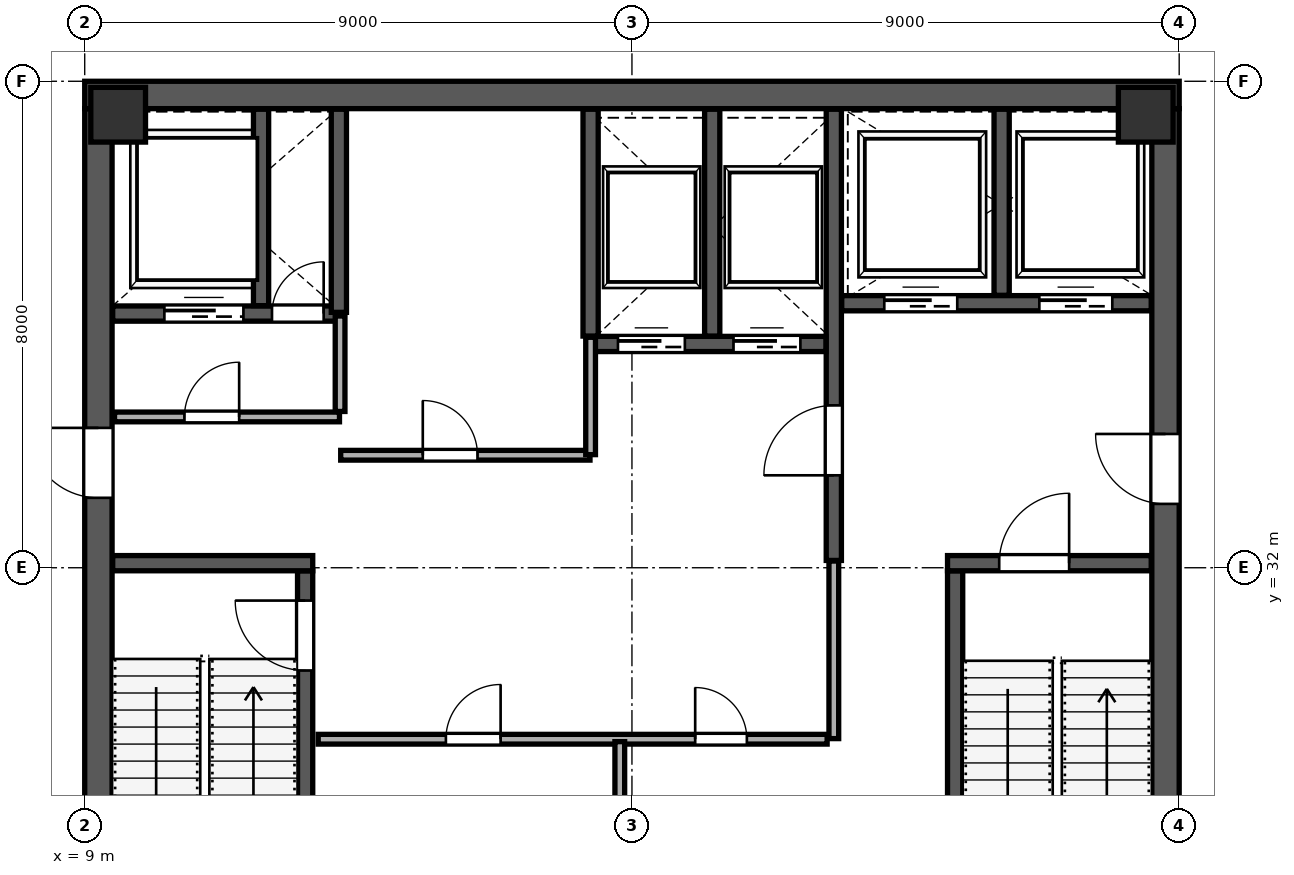
"""IFC4 building model, lengths in metres.
Left out: names, types, materials, properties, quantities, classifications, styles, units other than length and angle.
Written with IfcOpenShell. Run it as: python <this file> out.ifc"""

import sys

from ifc_helpers import new_model, si_unit, direction, frame, frame_2d, origin, origin_2d, place, context, subcontext, project, spatial, rectangle, extrude, source, transform, mapped, element, fill, save


model = new_model("IFC4")
c1 = context("Model", 3, precision=1e-05, world=origin(), true_north=direction((0.0, 1.0)))
c2 = subcontext(c1, "Body", "Model", "MODEL_VIEW")
j1 = project(units=[si_unit("LENGTHUNIT", "METRE"), si_unit("PLANEANGLEUNIT", "RADIAN")], contexts=[c1])
p1 = place(None, origin())
s1 = spatial("IfcSite", under=j1, at=p1, CompositionType="ELEMENT")
p2 = place(p1, origin())
s2 = spatial("IfcBuilding", under=s1, at=p2, CompositionType="ELEMENT")
p3 = place(p2, frame((0.0, 0.0, 275.2)))
s3 = spatial("IfcBuildingStorey", under=s2, at=p3, CompositionType="ELEMENT", Elevation=275.2)
m1 = source(origin(), c2, "Body", "SweptSolid", [
    extrude(rectangle(XDim=0.9, YDim=0.9, at=origin_2d()), origin(), (0.0, 0.0, 1.0), 4.198),
])
for number, where, z_axis, x_axis in (
    (1, (9.55, 39.45, 0.001), (0.0, 0.0, 1.0), (1.0, 0.0, 0.0)),
    (2, (26.45, 39.45, 0.001), (0.0, 0.0, 1.0), (1.0, 0.0, 0.0)),
):
    element("IfcColumn", number, at=place(p3, frame(where, z_axis=z_axis, x_axis=x_axis)), inside=s3, PredefinedType="COLUMN", context=c2, shape_type="MappedRepresentation", body=[
        mapped(m1, transform((0.0, 0.0, 0.0), scale=1.0)),
    ])
p4 = place(p3, frame((9.225, 24.45, 0.0), z_axis=(0.0, 0.0, 1.0), x_axis=(0.0, 1.0, 0.0)))
e3 = element("IfcWall", 3, at=p4, inside=s3, PredefinedType="SHEAR", context=c2, shape_type="SweptSolid", body=[
    extrude(rectangle(XDim=15.1, YDim=0.45, at=frame_2d((7.55, 0.0))), origin(), (0.0, 0.0, 1.0), 3.96),
])
p5 = place(p4, frame((8.7, 0.0, 0.0)))
e4 = element("IfcOpeningElement", 4, at=p5, cuts=e3, PredefinedType="OPENING", context=c2, shape_type="SweptSolid", body=[
    extrude(rectangle(XDim=1.15, YDim=2.2, at=frame_2d((0.575, 1.1))), frame((0.0, 0.235, 0.0), z_axis=(0.0, -1.0, 0.0), x_axis=(1.0, 0.0, 0.0)), (0.0, 0.0, 1.0), 0.47),
])
p6 = place(p3, frame((26.775, 24.45, 0.0), z_axis=(0.0, 0.0, 1.0), x_axis=(0.0, 1.0, 0.0)))
e5 = element("IfcWall", 5, at=p6, inside=s3, PredefinedType="SHEAR", context=c2, shape_type="SweptSolid", body=[
    extrude(rectangle(XDim=15.1, YDim=0.45, at=frame_2d((7.55, 0.0))), origin(), (0.0, 0.0, 1.0), 3.96),
])
p7 = place(p6, frame((8.6, 0.0, 0.0)))
e6 = element("IfcOpeningElement", 6, at=p7, cuts=e5, PredefinedType="OPENING", context=c2, shape_type="SweptSolid", body=[
    extrude(rectangle(XDim=1.15, YDim=2.2, at=frame_2d((0.575, 1.1))), frame((0.0, 0.235, 0.0), z_axis=(0.0, -1.0, 0.0), x_axis=(1.0, 0.0, 0.0)), (0.0, 0.0, 1.0), 0.47),
])
p8 = place(p3, frame((9.0, 39.775, 0.0), z_axis=(0.0, 0.0, 1.0), x_axis=(1.0, 0.0, 0.0)))
e7 = element("IfcWall", 7, at=p8, inside=s3, PredefinedType="SHEAR", context=c2, shape_type="SweptSolid", body=[
    extrude(rectangle(XDim=18.0, YDim=0.45, at=frame_2d((9.0, 0.0))), origin(), (0.0, 0.0, 1.0), 3.96),
])
p9 = place(p3, frame((12.625, 24.46, 0.0), z_axis=(0.0, 0.0, 1.0), x_axis=(0.0, 1.0, 0.0)))
e8 = element("IfcWall", 8, at=p9, inside=s3, PredefinedType="SHEAR", context=c2, shape_type="SweptSolid", body=[
    extrude(rectangle(XDim=7.49, YDim=0.25, at=frame_2d((3.745, 0.0))), origin(), (0.0, 0.0, 1.0), 3.96),
])
p10 = place(p9, frame((5.85, 0.0, 0.0)))
e9 = element("IfcOpeningElement", 9, at=p10, cuts=e8, PredefinedType="OPENING", context=c2, shape_type="SweptSolid", body=[
    extrude(rectangle(XDim=1.15, YDim=2.2, at=frame_2d((0.575, 1.1))), frame((0.0, 0.135, 0.0), z_axis=(0.0, -1.0, 0.0), x_axis=(1.0, 0.0, 0.0)), (0.0, 0.0, 1.0), 0.27),
])
p11 = place(p3, frame((9.46, 32.075, 0.0), z_axis=(0.0, 0.0, 1.0), x_axis=(1.0, 0.0, 0.0)))
e10 = element("IfcWall", 10, at=p11, inside=s3, PredefinedType="SHEAR", context=c2, shape_type="SweptSolid", body=[
    extrude(rectangle(XDim=3.29, YDim=0.25, at=frame_2d((1.645, 0.0))), origin(), (0.0, 0.0, 1.0), 3.96),
])
p12 = place(p3, frame((23.315, 24.46, 0.0), z_axis=(0.0, 0.0, 1.0), x_axis=(0.0, 1.0, 0.0)))
e11 = element("IfcWall", 11, at=p12, inside=s3, PredefinedType="SHEAR", context=c2, shape_type="SweptSolid", body=[
    extrude(rectangle(XDim=7.49, YDim=0.25, at=frame_2d((3.745, 0.0))), origin(), (0.0, 0.0, 1.0), 3.96),
])
p13 = place(p3, frame((23.19, 32.075, 0.0), z_axis=(0.0, 0.0, 1.0), x_axis=(1.0, 0.0, 0.0)))
e12 = element("IfcWall", 12, at=p13, inside=s3, PredefinedType="SHEAR", context=c2, shape_type="SweptSolid", body=[
    extrude(rectangle(XDim=3.35, YDim=0.25, at=frame_2d((1.675, 0.0))), origin(), (0.0, 0.0, 1.0), 3.96),
])
p14 = place(p13, frame((0.85, 0.0, 0.0)))
e13 = element("IfcOpeningElement", 13, at=p14, cuts=e12, PredefinedType="OPENING", context=c2, shape_type="SweptSolid", body=[
    extrude(rectangle(XDim=1.15, YDim=2.2, at=frame_2d((0.575, 1.1))), frame((0.0, 0.135, 0.0), z_axis=(0.0, -1.0, 0.0), x_axis=(1.0, 0.0, 0.0)), (0.0, 0.0, 1.0), 0.27),
])
p15 = place(p3, frame((21.32, 32.12, 0.0), z_axis=(0.0, 0.0, 1.0), x_axis=(0.0, 1.0, 0.0)))
e14 = element("IfcWall", 14, at=p15, inside=s3, PredefinedType="SHEAR", context=c2, shape_type="SweptSolid", body=[
    extrude(rectangle(XDim=7.42, YDim=0.25, at=frame_2d((3.71, 0.0))), origin(), (0.0, 0.0, 1.0), 3.96),
])
p16 = place(p15, frame((1.4, 0.0, 0.0)))
e15 = element("IfcOpeningElement", 15, at=p16, cuts=e14, PredefinedType="OPENING", context=c2, shape_type="SweptSolid", body=[
    extrude(rectangle(XDim=1.15, YDim=2.2, at=frame_2d((0.575, 1.1))), frame((0.0, 0.135, 0.0), z_axis=(0.0, -1.0, 0.0), x_axis=(1.0, 0.0, 0.0)), (0.0, 0.0, 1.0), 0.27),
])
p17 = place(p3, frame((9.46, 36.18, 0.0), z_axis=(0.0, 0.0, 1.0), x_axis=(1.0, 0.0, 0.0)))
e16 = element("IfcWall", 16, at=p17, inside=s3, PredefinedType="SHEAR", context=c2, shape_type="SweptSolid", body=[
    extrude(rectangle(XDim=3.79, YDim=0.25, at=frame_2d((1.895, 0.0))), origin(), (0.0, 0.0, 1.0), 3.96),
])
p18 = place(p17, frame((2.62, 0.0, 0.0)))
e17 = element("IfcOpeningElement", 17, at=p18, cuts=e16, PredefinedType="OPENING", context=c2, shape_type="SweptSolid", body=[
    extrude(rectangle(XDim=0.85, YDim=2.1, at=frame_2d((0.425, 1.05))), frame((0.0, 0.135, 0.0), z_axis=(0.0, -1.0, 0.0), x_axis=(1.0, 0.0, 0.0)), (0.0, 0.0, 1.0), 0.27),
])
p19 = place(p17, frame((0.85, 0.0, 0.0)))
e18 = element("IfcOpeningElement", 18, at=p19, cuts=e16, PredefinedType="OPENING", context=c2, shape_type="SweptSolid", body=[
    extrude(rectangle(XDim=1.3, YDim=2.25, at=frame_2d((0.65, 1.125))), frame((0.0, 0.135, 0.0), z_axis=(0.0, -1.0, 0.0), x_axis=(1.0, 0.0, 0.0)), (0.0, 0.0, 1.0), 0.27),
])
p20 = place(p3, frame((11.9, 36.31, 0.0), z_axis=(0.0, 0.0, 1.0), x_axis=(0.0, 1.0, 0.0)))
e19 = element("IfcWall", 19, at=p20, inside=s3, PredefinedType="SHEAR", context=c2, shape_type="SweptSolid", body=[
    extrude(rectangle(XDim=3.23, YDim=0.25, at=frame_2d((1.615, 0.0))), origin(), (0.0, 0.0, 1.0), 3.96),
])
p21 = place(p3, frame((21.45, 36.35, 0.0), z_axis=(0.0, 0.0, 1.0), x_axis=(1.0, 0.0, 0.0)))
e20 = element("IfcWall", 20, at=p21, inside=s3, PredefinedType="SHEAR", context=c2, shape_type="SweptSolid", body=[
    extrude(rectangle(XDim=5.09, YDim=0.25, at=frame_2d((2.545, 0.0))), origin(), (0.0, 0.0, 1.0), 3.96),
])
p22 = place(p21, frame((0.7, 0.0, 0.0)))
e21 = element("IfcOpeningElement", 21, at=p22, cuts=e20, PredefinedType="OPENING", context=c2, shape_type="SweptSolid", body=[
    extrude(rectangle(XDim=1.2, YDim=2.2, at=frame_2d((0.6, 1.1))), frame((0.0, 0.135, 0.0), z_axis=(0.0, -1.0, 0.0), x_axis=(1.0, 0.0, 0.0)), (0.0, 0.0, 1.0), 0.27),
])
p23 = place(p21, frame((3.25, 0.0, 0.0)))
e22 = element("IfcOpeningElement", 22, at=p23, cuts=e20, PredefinedType="OPENING", context=c2, shape_type="SweptSolid", body=[
    extrude(rectangle(XDim=1.2, YDim=2.2, at=frame_2d((0.6, 1.1))), frame((0.0, 0.135, 0.0), z_axis=(0.0, -1.0, 0.0), x_axis=(1.0, 0.0, 0.0)), (0.0, 0.0, 1.0), 0.27),
])
p24 = place(p3, frame((24.08, 36.48, 0.0), z_axis=(0.0, 0.0, 1.0), x_axis=(0.0, 1.0, 0.0)))
e23 = element("IfcWall", 23, at=p24, inside=s3, PredefinedType="SHEAR", context=c2, shape_type="SweptSolid", body=[
    extrude(rectangle(XDim=3.06, YDim=0.25, at=frame_2d((1.53, 0.0))), origin(), (0.0, 0.0, 1.0), 3.96),
])
p25 = place(p3, frame((13.18, 36.2, 0.0), z_axis=(0.0, 0.0, 1.0), x_axis=(0.0, 1.0, 0.0)))
e24 = element("IfcWall", 24, at=p25, inside=s3, PredefinedType="SHEAR", context=c2, shape_type="SweptSolid", body=[
    extrude(rectangle(XDim=3.34, YDim=0.25, at=frame_2d((1.67, 0.0))), origin(), (0.0, 0.0, 1.0), 3.96),
])
p26 = place(p3, frame((17.32, 35.68, 0.0), z_axis=(0.0, 0.0, 1.0), x_axis=(1.0, 0.0, 0.0)))
e25 = element("IfcWall", 25, at=p26, inside=s3, PredefinedType="SHEAR", context=c2, shape_type="SweptSolid", body=[
    extrude(rectangle(XDim=3.87, YDim=0.25, at=frame_2d((1.935, 0.0))), origin(), (0.0, 0.0, 1.0), 3.96),
])
p27 = place(p26, frame((0.45, 0.0, 0.0)))
e26 = element("IfcOpeningElement", 26, at=p27, cuts=e25, PredefinedType="OPENING", context=c2, shape_type="SweptSolid", body=[
    extrude(rectangle(XDim=1.1, YDim=2.2, at=frame_2d((0.55, 1.1))), frame((0.0, 0.135, 0.0), z_axis=(0.0, -1.0, 0.0), x_axis=(1.0, 0.0, 0.0)), (0.0, 0.0, 1.0), 0.27),
])
p28 = place(p26, frame((2.35, 0.0, 0.0)))
e27 = element("IfcOpeningElement", 27, at=p28, cuts=e25, PredefinedType="OPENING", context=c2, shape_type="SweptSolid", body=[
    extrude(rectangle(XDim=1.1, YDim=2.2, at=frame_2d((0.55, 1.1))), frame((0.0, 0.135, 0.0), z_axis=(0.0, -1.0, 0.0), x_axis=(1.0, 0.0, 0.0)), (0.0, 0.0, 1.0), 0.27),
])
for number, where, z_axis, x_axis in (
    (28, (17.32, 35.81, 0.0), (0.0, 0.0, 1.0), (0.0, 1.0, 0.0)),
    (29, (19.32, 35.81, 0.0), (0.0, 0.0, 1.0), (0.0, 1.0, 0.0)),
):
    element("IfcWall", number, at=place(p3, frame(where, z_axis=z_axis, x_axis=x_axis)), inside=s3, PredefinedType="SHEAR", context=c2, shape_type="SweptSolid", body=[
        extrude(rectangle(XDim=3.73, YDim=0.25, at=frame_2d((1.865, 0.0))), origin(), (0.0, 0.0, 1.0), 3.96),
    ])
p29 = place(p3, frame((9.49, 34.48, 0.0), z_axis=(0.0, 0.0, 1.0), x_axis=(1.0, 0.0, 0.0)))
e30 = element("IfcWall", 30, at=p29, inside=s3, PredefinedType="PARTITIONING", context=c2, shape_type="SweptSolid", body=[
    extrude(rectangle(XDim=3.7, YDim=0.16, at=frame_2d((1.85, 0.0))), origin(), (0.0, 0.0, 1.0), 3.96),
])
p30 = place(p29, frame((1.15, 0.0, 0.0)))
e31 = element("IfcOpeningElement", 31, at=p30, cuts=e30, PredefinedType="OPENING", context=c2, shape_type="SweptSolid", body=[
    extrude(rectangle(XDim=0.9, YDim=2.15, at=frame_2d((0.45, 1.075))), frame((0.0, 0.09, 0.0), z_axis=(0.0, -1.0, 0.0), x_axis=(1.0, 0.0, 0.0)), (0.0, 0.0, 1.0), 0.18),
])
p31 = place(p3, frame((13.2, 34.57, 0.0), z_axis=(0.0, 0.0, 1.0), x_axis=(0.0, 1.0, 0.0)))
e32 = element("IfcWall", 32, at=p31, inside=s3, PredefinedType="PARTITIONING", context=c2, shape_type="SweptSolid", body=[
    extrude(rectangle(XDim=1.57, YDim=0.16, at=frame_2d((0.785, 0.0))), origin(), (0.0, 0.0, 1.0), 3.96),
])
p32 = place(p3, frame((13.21, 33.85, 0.0), z_axis=(0.0, 0.0, 1.0), x_axis=(1.0, 0.0, 0.0)))
e33 = element("IfcWall", 33, at=p32, inside=s3, PredefinedType="PARTITIONING", context=c2, shape_type="SweptSolid", body=[
    extrude(rectangle(XDim=4.1, YDim=0.16, at=frame_2d((2.05, 0.0))), origin(), (0.0, 0.0, 1.0), 3.96),
])
p33 = place(p32, frame((1.35, 0.0, 0.0)))
e34 = element("IfcOpeningElement", 34, at=p33, cuts=e33, PredefinedType="OPENING", context=c2, shape_type="SweptSolid", body=[
    extrude(rectangle(XDim=0.9, YDim=2.15, at=frame_2d((0.45, 1.075))), frame((0.0, 0.09, 0.0), z_axis=(0.0, -1.0, 0.0), x_axis=(1.0, 0.0, 0.0)), (0.0, 0.0, 1.0), 0.18),
])
p34 = place(p3, frame((17.32, 33.86, 0.0), z_axis=(0.0, 0.0, 1.0), x_axis=(0.0, 1.0, 0.0)))
e35 = element("IfcWall", 35, at=p34, inside=s3, PredefinedType="PARTITIONING", context=c2, shape_type="SweptSolid", body=[
    extrude(rectangle(XDim=1.93, YDim=0.16, at=frame_2d((0.965, 0.0))), origin(), (0.0, 0.0, 1.0), 3.96),
])
p35 = place(p3, frame((12.84, 29.18, 0.0), z_axis=(0.0, 0.0, 1.0), x_axis=(1.0, 0.0, 0.0)))
e36 = element("IfcWall", 36, at=p35, inside=s3, PredefinedType="PARTITIONING", context=c2, shape_type="SweptSolid", body=[
    extrude(rectangle(XDim=8.37, YDim=0.16, at=frame_2d((4.185, 0.0))), origin(), (0.0, 0.0, 1.0), 3.96),
])
p36 = place(p35, frame((2.1, 0.0, 0.0)))
e37 = element("IfcOpeningElement", 37, at=p36, cuts=e36, PredefinedType="OPENING", context=c2, shape_type="SweptSolid", body=[
    extrude(rectangle(XDim=0.9, YDim=2.15, at=frame_2d((0.45, 1.075))), frame((0.0, 0.09, 0.0), z_axis=(0.0, -1.0, 0.0), x_axis=(1.0, 0.0, 0.0)), (0.0, 0.0, 1.0), 0.18),
])
p37 = place(p35, frame((6.2, 0.0, 0.0)))
e38 = element("IfcOpeningElement", 38, at=p37, cuts=e36, PredefinedType="OPENING", context=c2, shape_type="SweptSolid", body=[
    extrude(rectangle(XDim=0.85, YDim=2.1, at=frame_2d((0.425, 1.05))), frame((0.0, 0.09, 0.0), z_axis=(0.0, -1.0, 0.0), x_axis=(1.0, 0.0, 0.0)), (0.0, 0.0, 1.0), 0.18),
])
p38 = place(p3, frame((17.8, 24.54, 0.0), z_axis=(0.0, 0.0, 1.0), x_axis=(0.0, 1.0, 0.0)))
e39 = element("IfcWall", 39, at=p38, inside=s3, PredefinedType="PARTITIONING", context=c2, shape_type="SweptSolid", body=[
    extrude(rectangle(XDim=4.6, YDim=0.16, at=frame_2d((2.3, 0.0))), origin(), (0.0, 0.0, 1.0), 3.96),
])
p39 = place(p3, frame((21.32, 29.19, 0.0), z_axis=(0.0, 0.0, 1.0), x_axis=(0.0, 1.0, 0.0)))
e40 = element("IfcWall", 40, at=p39, inside=s3, PredefinedType="PARTITIONING", context=c2, shape_type="SweptSolid", body=[
    extrude(rectangle(XDim=2.92, YDim=0.16, at=frame_2d((1.46, 0.0))), origin(), (0.0, 0.0, 1.0), 3.96),
])
p40 = place(p3, frame((4.002, 29.471, 0.0), z_axis=(0.0, 0.0, 1.0), x_axis=(0.642802048813, -0.766032327021, 0.0)))
e41 = element("IfcWall", 41, at=p40, inside=s3, PredefinedType="PARTITIONING", context=c2, shape_type="SweptSolid", body=[
    extrude(rectangle(XDim=11.57, YDim=0.16, at=frame_2d((5.785, 0.0))), origin(), (0.0, 0.0, 1.0), 3.96),
])
p41 = place(p40, frame((1.15, 0.0, 0.0)))
e42 = element("IfcOpeningElement", 42, at=p41, cuts=e41, PredefinedType="OPENING", context=c2, shape_type="SweptSolid", body=[
    extrude(rectangle(XDim=0.95, YDim=2.15, at=frame_2d((0.475, 1.075))), frame((0.0, 0.09, 0.0), z_axis=(0.0, -1.0, 0.0), x_axis=(1.0, 0.0, 0.0)), (0.0, 0.0, 1.0), 0.18),
])
p42 = place(p3, frame((19.528, 51.245, 0.0), z_axis=(0.0, 0.0, 1.0), x_axis=(0.642782364439, -0.766048844374, 0.0)))
e43 = element("IfcWall", 43, at=p42, inside=s3, PredefinedType="PARTITIONING", context=c2, shape_type="SweptSolid", body=[
    extrude(rectangle(XDim=27.34, YDim=0.1, at=frame_2d((13.67, 0.0))), origin(), (0.0, 0.0, 1.0), 3.96),
])
p43 = place(p42, frame((10.8, 0.0, 0.0)))
e44 = element("IfcOpeningElement", 44, at=p43, cuts=e43, PredefinedType="OPENING", context=c2, shape_type="SweptSolid", body=[
    extrude(rectangle(XDim=0.95, YDim=2.15, at=frame_2d((0.475, 1.075))), frame((0.0, 0.06, 0.0), z_axis=(0.0, -1.0, 0.0), x_axis=(1.0, 0.0, 0.0)), (0.0, 0.0, 1.0), 0.12),
])
p44 = place(p3, frame((0.849, 35.624, 0.0), z_axis=(0.0, 0.0, 1.0), x_axis=(0.766042777978, 0.642789594119, 0.0)))
e45 = element("IfcWall", 45, at=p44, inside=s3, PredefinedType="PARTITIONING", context=c2, shape_type="SweptSolid", body=[
    extrude(rectangle(XDim=29.51, YDim=0.115, at=frame_2d((14.755, 0.0))), origin(), (0.0, 0.0, 1.0), 3.96),
])
p45 = place(p44, frame((2.6, 0.0, 0.0)))
e46 = element("IfcOpeningElement", 46, at=p45, cuts=e45, PredefinedType="OPENING", context=c2, shape_type="SweptSolid", body=[
    extrude(rectangle(XDim=0.95, YDim=2.15, at=frame_2d((0.475, 1.075))), frame((0.0, 0.067, 0.0), z_axis=(0.0, -1.0, 0.0), x_axis=(1.0, 0.0, 0.0)), (0.0, 0.0, 1.0), 0.135),
])
p46 = place(p3, frame((25.576, 20.577, 0.0), z_axis=(0.0, 0.0, 1.0), x_axis=(0.76604764673, 0.642783791752, 0.0)))
e47 = element("IfcWall", 47, at=p46, inside=s3, PredefinedType="PARTITIONING", context=c2, shape_type="SweptSolid", body=[
    extrude(rectangle(XDim=20.24, YDim=0.16, at=frame_2d((10.12, 0.0))), origin(), (0.0, 0.0, 1.0), 3.195),
])
m2 = source(origin(), c2, "Body", "SweptSolid", [
    extrude(rectangle(XDim=1.15, YDim=2.2, at=frame_2d((0.575, 1.1))), frame((0.0, 0.025, 0.0), z_axis=(0.0, -1.0, 0.0), x_axis=(1.0, 0.0, 0.0)), (0.0, 0.0, 1.0), 0.05),
])
p47 = place(p10, origin())
e48 = element("IfcDoor", 48, at=p47, inside=s3, OperationType="SINGLE_SWING_RIGHT", PredefinedType="DOOR", context=c2, shape_type="MappedRepresentation", body=[
    mapped(m2, transform((0.0, 0.0, 0.0), scale=1.0)),
])
fill(e9, e48)
m3 = source(origin(), c2, "Body", "SweptSolid", [
    extrude(rectangle(XDim=1.15, YDim=2.2, at=frame_2d((0.575, 1.1))), frame((0.0, 0.025, 0.0), z_axis=(0.0, -1.0, 0.0), x_axis=(1.0, 0.0, 0.0)), (0.0, 0.0, 1.0), 0.05),
])
p48 = place(p16, origin())
e49 = element("IfcDoor", 49, at=p48, inside=s3, OperationType="SINGLE_SWING_LEFT", PredefinedType="DOOR", context=c2, shape_type="MappedRepresentation", body=[
    mapped(m3, transform((0.0, 0.0, 0.0), scale=1.0)),
])
fill(e15, e49)
p49 = place(p14, origin())
e50 = element("IfcDoor", 50, at=p49, inside=s3, OperationType="SINGLE_SWING_RIGHT", PredefinedType="DOOR", context=c2, shape_type="MappedRepresentation", body=[
    mapped(m2, transform((0.0, 0.0, 0.0), scale=1.0)),
])
fill(e13, e50)
p50 = place(p7, origin())
e51 = element("IfcDoor", 51, at=p50, inside=s3, OperationType="SINGLE_SWING_RIGHT", PredefinedType="DOOR", context=c2, shape_type="MappedRepresentation", body=[
    mapped(m3, transform((0.0, 0.0, 0.0), scale=1.0)),
])
fill(e6, e51)
p51 = place(p5, origin())
e52 = element("IfcDoor", 52, at=p51, inside=s3, OperationType="SINGLE_SWING_RIGHT", PredefinedType="DOOR", context=c2, shape_type="MappedRepresentation", body=[
    mapped(m3, transform((0.0, 0.0, 0.0), scale=1.0)),
])
fill(e4, e52)
m4 = source(origin(), c2, "Body", "SweptSolid", [
    extrude(rectangle(XDim=0.85, YDim=2.1, at=frame_2d((0.425, 1.05))), frame((0.0, 0.025, 0.0), z_axis=(0.0, -1.0, 0.0), x_axis=(1.0, 0.0, 0.0)), (0.0, 0.0, 1.0), 0.05),
])
p52 = place(p18, origin())
e53 = element("IfcDoor", 53, at=p52, inside=s3, OperationType="SINGLE_SWING_RIGHT", PredefinedType="DOOR", context=c2, shape_type="MappedRepresentation", body=[
    mapped(m4, transform((0.0, 0.0, 0.0), scale=1.0)),
])
fill(e17, e53)
m5 = source(origin(), c2, "Body", "SweptSolid", [
    extrude(rectangle(XDim=1.1, YDim=2.2, at=frame_2d((0.55, 1.1))), frame((0.0, 0.025, 0.0), z_axis=(0.0, -1.0, 0.0), x_axis=(1.0, 0.0, 0.0)), (0.0, 0.0, 1.0), 0.05),
])
p53 = place(p27, origin())
e54 = element("IfcDoor", 54, at=p53, inside=s3, OperationType="SLIDING_TO_LEFT", PredefinedType="DOOR", context=c2, shape_type="MappedRepresentation", body=[
    mapped(m5, transform((0.0, 0.0, 0.0), scale=1.0)),
])
fill(e26, e54)
p54 = place(p28, origin())
e55 = element("IfcDoor", 55, at=p54, inside=s3, OperationType="SLIDING_TO_RIGHT", PredefinedType="DOOR", context=c2, shape_type="MappedRepresentation", body=[
    mapped(m5, transform((0.0, 0.0, 0.0), scale=1.0)),
])
fill(e27, e55)
m6 = source(origin(), c2, "Body", "SweptSolid", [
    extrude(rectangle(XDim=1.2, YDim=2.2, at=frame_2d((0.6, 1.1))), frame((0.0, 0.025, 0.0), z_axis=(0.0, -1.0, 0.0), x_axis=(1.0, 0.0, 0.0)), (0.0, 0.0, 1.0), 0.05),
])
p55 = place(p22, origin())
e56 = element("IfcDoor", 56, at=p55, inside=s3, OperationType="SLIDING_TO_LEFT", PredefinedType="DOOR", context=c2, shape_type="MappedRepresentation", body=[
    mapped(m6, transform((0.0, 0.0, 0.0), scale=1.0)),
])
fill(e21, e56)
p56 = place(p23, origin())
e57 = element("IfcDoor", 57, at=p56, inside=s3, OperationType="SLIDING_TO_RIGHT", PredefinedType="DOOR", context=c2, shape_type="MappedRepresentation", body=[
    mapped(m6, transform((0.0, 0.0, 0.0), scale=1.0)),
])
fill(e22, e57)
m7 = source(origin(), c2, "Body", "SweptSolid", [
    extrude(rectangle(XDim=1.3, YDim=2.25, at=frame_2d((0.65, 1.125))), frame((0.0, 0.025, 0.0), z_axis=(0.0, -1.0, 0.0), x_axis=(1.0, 0.0, 0.0)), (0.0, 0.0, 1.0), 0.05),
])
p57 = place(p19, origin())
e58 = element("IfcDoor", 58, at=p57, inside=s3, OperationType="SLIDING_TO_LEFT", PredefinedType="DOOR", context=c2, shape_type="MappedRepresentation", body=[
    mapped(m7, transform((0.0, 0.0, 0.0), scale=1.0)),
])
fill(e18, e58)
m8 = source(origin(), c2, "Body", "SweptSolid", [
    extrude(rectangle(XDim=0.9, YDim=2.15, at=frame_2d((0.45, 1.075))), frame((0.0, 0.025, 0.0), z_axis=(0.0, -1.0, 0.0), x_axis=(1.0, 0.0, 0.0)), (0.0, 0.0, 1.0), 0.05),
])
p58 = place(p30, origin())
e59 = element("IfcDoor", 59, at=p58, inside=s3, OperationType="SINGLE_SWING_RIGHT", PredefinedType="DOOR", context=c2, shape_type="MappedRepresentation", body=[
    mapped(m8, transform((0.0, 0.0, 0.0), scale=1.0)),
])
fill(e31, e59)
p59 = place(p33, origin())
e60 = element("IfcDoor", 60, at=p59, inside=s3, OperationType="SINGLE_SWING_LEFT", PredefinedType="DOOR", context=c2, shape_type="MappedRepresentation", body=[
    mapped(m8, transform((0.0, 0.0, 0.0), scale=1.0)),
])
fill(e34, e60)
p60 = place(p36, origin())
e61 = element("IfcDoor", 61, at=p60, inside=s3, OperationType="SINGLE_SWING_RIGHT", PredefinedType="DOOR", context=c2, shape_type="MappedRepresentation", body=[
    mapped(m8, transform((0.0, 0.0, 0.0), scale=1.0)),
])
fill(e37, e61)
p61 = place(p37, origin())
e62 = element("IfcDoor", 62, at=p61, inside=s3, OperationType="SINGLE_SWING_LEFT", PredefinedType="DOOR", context=c2, shape_type="MappedRepresentation", body=[
    mapped(m4, transform((0.0, 0.0, 0.0), scale=1.0)),
])
fill(e38, e62)
save(model, sys.argv[1])
